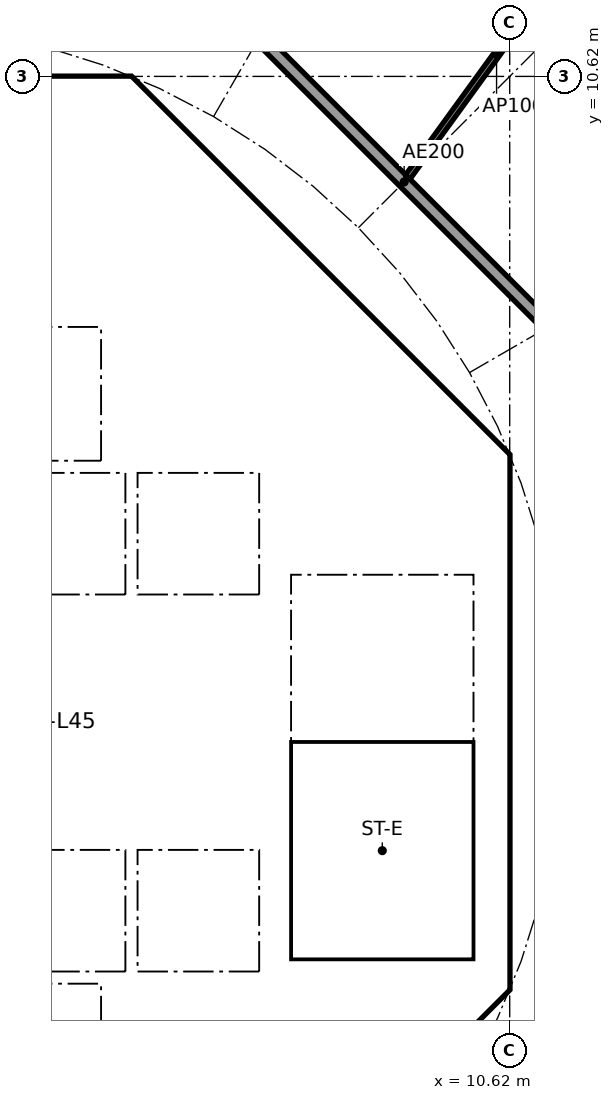
"""IFC4 building model, lengths in metres.
Left out: names, types, materials, properties, quantities, classifications, styles, units other than length and angle.
Written with IfcOpenShell. Run it as: python <this file> out.ifc"""

import sys

from ifc_helpers import new_model, si_unit, direction, frame, frame_2d, origin, place, context, subcontext, project, spatial, polyline, rectangle, outline, extrude, element, fill, save


model = new_model("IFC4")
c1 = context("Model", 3, precision=1e-05, world=origin(), true_north=direction((0.0, 1.0)))
c2 = subcontext(c1, "Body", "Model", "MODEL_VIEW")
j1 = project(units=[si_unit("LENGTHUNIT", "METRE"), si_unit("PLANEANGLEUNIT", "RADIAN")], contexts=[c1])
p1 = place(None, origin())
s1 = spatial("IfcSite", under=j1, at=p1, CompositionType="ELEMENT")
p2 = place(p1, origin())
s2 = spatial("IfcBuilding", under=s1, at=p2, CompositionType="ELEMENT")
p3 = place(p2, frame((0.0, 0.0, 173.3)))
s3 = spatial("IfcBuildingStorey", under=s2, at=p3, CompositionType="ELEMENT", Elevation=173.3)
p4 = place(p3, frame((9.988, 4.613, 0.0), z_axis=(0.0, 0.0, 1.0), x_axis=(-0.707106781187, 0.707106781187, 0.0)))
e1 = element("IfcWall", 1, at=p4, inside=s3, PredefinedType="SHEAR", context=c2, shape_type="SweptSolid", body=[
    extrude(rectangle(XDim=7.602, YDim=0.6, at=frame_2d((3.801, 0.0))), origin(), (0.0, 0.0, 1.0), 3.44),
])
p5 = place(p4, frame((3.201, 0.0, 0.0)))
e2 = element("IfcOpeningElement", 2, at=p5, cuts=e1, PredefinedType="OPENING", context=c2, shape_type="SweptSolid", body=[
    extrude(rectangle(XDim=1.2, YDim=2.1, at=frame_2d((0.6, 1.05))), frame((0.0, 0.31, 0.0), z_axis=(0.0, -1.0, 0.0), x_axis=(1.0, 0.0, 0.0)), (0.0, 0.0, 1.0), 0.62),
])
p6 = place(p3, frame((4.613, -9.988, 0.0), z_axis=(0.0, 0.0, 1.0), x_axis=(0.707106781187, 0.707106781187, 0.0)))
e3 = element("IfcWall", 3, at=p6, inside=s3, PredefinedType="SHEAR", context=c2, shape_type="SweptSolid", body=[
    extrude(rectangle(XDim=7.602, YDim=0.6, at=frame_2d((3.801, 0.0))), origin(), (0.0, 0.0, 1.0), 3.44),
])
p7 = place(p6, frame((3.201, 0.0, 0.0)))
e4 = element("IfcOpeningElement", 4, at=p7, cuts=e3, PredefinedType="OPENING", context=c2, shape_type="SweptSolid", body=[
    extrude(rectangle(XDim=1.2, YDim=2.1, at=frame_2d((0.6, 1.05))), frame((0.0, 0.31, 0.0), z_axis=(0.0, -1.0, 0.0), x_axis=(1.0, 0.0, 0.0)), (0.0, 0.0, 1.0), 0.62),
])
p8 = place(p3, frame((4.0, 4.3, 0.0), z_axis=(0.0, 0.0, 1.0), x_axis=(0.0, 1.0, 0.0)))
e5 = element("IfcWall", 5, at=p8, inside=s3, PredefinedType="SOLIDWALL", context=c2, shape_type="SweptSolid", body=[
    extrude(rectangle(XDim=2.2, YDim=0.2, at=frame_2d((1.1, 0.0))), origin(), (0.0, 0.0, 1.0), 3.44),
])
p9 = place(p8, frame((0.55, 0.0, 0.0)))
e6 = element("IfcOpeningElement", 6, at=p9, cuts=e5, PredefinedType="OPENING", context=c2, shape_type="SweptSolid", body=[
    extrude(rectangle(XDim=1.1, YDim=2.1, at=frame_2d((0.55, 1.05))), frame((0.0, 0.11, 0.0), z_axis=(0.0, -1.0, 0.0), x_axis=(1.0, 0.0, 0.0)), (0.0, 0.0, 1.0), 0.22),
])
p10 = place(p3, frame((-6.7, 2.0, 0.0), z_axis=(0.0, 0.0, 1.0), x_axis=(1.0, 0.0, 0.0)))
e7 = element("IfcWall", 7, at=p10, inside=s3, PredefinedType="SOLIDWALL", context=c2, shape_type="SweptSolid", body=[
    extrude(rectangle(XDim=13.4, YDim=0.2, at=frame_2d((6.7, 0.0))), origin(), (0.0, 0.0, 1.0), 3.44),
])
p11 = place(p10, frame((7.25, 0.0, 0.0)))
e8 = element("IfcOpeningElement", 8, at=p11, cuts=e7, PredefinedType="OPENING", context=c2, shape_type="SweptSolid", body=[
    extrude(rectangle(XDim=1.1, YDim=2.1, at=frame_2d((0.55, 1.05))), frame((0.0, 0.11, 0.0), z_axis=(0.0, -1.0, 0.0), x_axis=(1.0, 0.0, 0.0)), (0.0, 0.0, 1.0), 0.22),
])
p12 = place(p10, frame((9.45, 0.0, 0.0)))
e9 = element("IfcOpeningElement", 9, at=p12, cuts=e7, PredefinedType="OPENING", context=c2, shape_type="SweptSolid", body=[
    extrude(rectangle(XDim=1.1, YDim=2.1, at=frame_2d((0.55, 1.05))), frame((0.0, 0.11, 0.0), z_axis=(0.0, -1.0, 0.0), x_axis=(1.0, 0.0, 0.0)), (0.0, 0.0, 1.0), 0.22),
])
p13 = place(p10, frame((0.75, 0.0, 0.0)))
e10 = element("IfcOpeningElement", 10, at=p13, cuts=e7, PredefinedType="OPENING", context=c2, shape_type="SweptSolid", body=[
    extrude(rectangle(XDim=0.9, YDim=2.1, at=frame_2d((0.45, 1.05))), frame((0.0, 0.11, 0.0), z_axis=(0.0, -1.0, 0.0), x_axis=(1.0, 0.0, 0.0)), (0.0, 0.0, 1.0), 0.22),
])
p14 = place(p10, frame((4.05, 0.0, 0.0)))
e11 = element("IfcOpeningElement", 11, at=p14, cuts=e7, PredefinedType="OPENING", context=c2, shape_type="SweptSolid", body=[
    extrude(rectangle(XDim=0.9, YDim=2.1, at=frame_2d((0.45, 1.05))), frame((0.0, 0.11, 0.0), z_axis=(0.0, -1.0, 0.0), x_axis=(1.0, 0.0, 0.0)), (0.0, 0.0, 1.0), 0.22),
])
p15 = place(p3, frame((6.7, 4.0, 0.0), z_axis=(0.0, 0.0, 1.0), x_axis=(1.0, 0.0, 0.0)))
e12 = element("IfcWall", 12, at=p15, inside=s3, PredefinedType="SOLIDWALL", context=c2, shape_type="SweptSolid", body=[
    extrude(rectangle(XDim=3.325, YDim=0.2, at=frame_2d((1.662, 0.0))), origin(), (0.0, 0.0, 1.0), 3.44),
])
p16 = place(p15, frame((1.25, 0.0, 0.0)))
e13 = element("IfcOpeningElement", 13, at=p16, cuts=e12, PredefinedType="OPENING", context=c2, shape_type="SweptSolid", body=[
    extrude(rectangle(XDim=1.1, YDim=2.1, at=frame_2d((0.55, 1.05))), frame((0.0, 0.11, 0.0), z_axis=(0.0, -1.0, 0.0), x_axis=(1.0, 0.0, 0.0)), (0.0, 0.0, 1.0), 0.22),
])
p17 = place(p3, frame((4.0, 7.025, 0.0), z_axis=(0.0, 0.0, 1.0), x_axis=(0.0, 1.0, 0.0)))
e14 = element("IfcWall", 14, at=p17, inside=s3, PredefinedType="SOLIDWALL", context=c2, shape_type="SweptSolid", body=[
    extrude(rectangle(XDim=3.0, YDim=0.2, at=frame_2d((1.5, 0.0))), origin(), (0.0, 0.0, 1.0), 3.44),
])
p18 = place(p17, frame((0.925, 0.0, 0.0)))
e15 = element("IfcOpeningElement", 15, at=p18, cuts=e14, PredefinedType="OPENING", context=c2, shape_type="SweptSolid", body=[
    extrude(rectangle(XDim=1.1, YDim=2.1, at=frame_2d((0.55, 1.05))), frame((0.0, 0.11, 0.0), z_axis=(0.0, -1.0, 0.0), x_axis=(1.0, 0.0, 0.0)), (0.0, 0.0, 1.0), 0.22),
])
p19 = place(p3, frame((4.0, -6.5, 0.0), z_axis=(0.0, 0.0, 1.0), x_axis=(0.0, 1.0, 0.0)))
e16 = element("IfcWall", 16, at=p19, inside=s3, PredefinedType="SOLIDWALL", context=c2, shape_type="SweptSolid", body=[
    extrude(rectangle(XDim=2.2, YDim=0.2, at=frame_2d((1.1, 0.0))), origin(), (0.0, 0.0, 1.0), 3.44),
])
p20 = place(p19, frame((0.55, 0.0, 0.0)))
e17 = element("IfcOpeningElement", 17, at=p20, cuts=e16, PredefinedType="OPENING", context=c2, shape_type="SweptSolid", body=[
    extrude(rectangle(XDim=1.1, YDim=2.1, at=frame_2d((0.55, 1.05))), frame((0.0, 0.11, 0.0), z_axis=(0.0, -1.0, 0.0), x_axis=(1.0, 0.0, 0.0)), (0.0, 0.0, 1.0), 0.22),
])
p21 = place(p3, frame((-6.7, -2.0, 0.0), z_axis=(0.0, 0.0, 1.0), x_axis=(1.0, 0.0, 0.0)))
e18 = element("IfcWall", 18, at=p21, inside=s3, PredefinedType="SOLIDWALL", context=c2, shape_type="SweptSolid", body=[
    extrude(rectangle(XDim=13.4, YDim=0.2, at=frame_2d((6.7, 0.0))), origin(), (0.0, 0.0, 1.0), 3.44),
])
p22 = place(p21, frame((5.05, 0.0, 0.0)))
e19 = element("IfcOpeningElement", 19, at=p22, cuts=e18, PredefinedType="OPENING", context=c2, shape_type="SweptSolid", body=[
    extrude(rectangle(XDim=1.1, YDim=2.1, at=frame_2d((0.55, 1.05))), frame((0.0, 0.11, 0.0), z_axis=(0.0, -1.0, 0.0), x_axis=(1.0, 0.0, 0.0)), (0.0, 0.0, 1.0), 0.22),
])
p23 = place(p21, frame((7.25, 0.0, 0.0)))
e20 = element("IfcOpeningElement", 20, at=p23, cuts=e18, PredefinedType="OPENING", context=c2, shape_type="SweptSolid", body=[
    extrude(rectangle(XDim=1.1, YDim=2.1, at=frame_2d((0.55, 1.05))), frame((0.0, 0.11, 0.0), z_axis=(0.0, -1.0, 0.0), x_axis=(1.0, 0.0, 0.0)), (0.0, 0.0, 1.0), 0.22),
])
p24 = place(p21, frame((1.85, 0.0, 0.0)))
e21 = element("IfcOpeningElement", 21, at=p24, cuts=e18, PredefinedType="OPENING", context=c2, shape_type="SweptSolid", body=[
    extrude(rectangle(XDim=0.9, YDim=2.1, at=frame_2d((0.45, 1.05))), frame((0.0, 0.11, 0.0), z_axis=(0.0, -1.0, 0.0), x_axis=(1.0, 0.0, 0.0)), (0.0, 0.0, 1.0), 0.22),
])
p25 = place(p3, origin())
e22 = element("IfcWall", 22, at=p25, inside=s3, PredefinedType="SHEAR", context=c2, shape_type="SweptSolid", body=[
    extrude(outline(polyline([(-4.152, 10.025), (-4.401, 9.776), (-4.825, 10.2), (-4.401, 10.625), (4.401, 10.625), (4.825, 10.2), (4.401, 9.776), (4.152, 10.025), (-4.152, 10.025)])), origin(), (0.0, 0.0, 1.0), 3.44),
])
p26 = place(p3, origin())
e23 = element("IfcWall", 23, at=p26, inside=s3, PredefinedType="SHEAR", context=c2, shape_type="SweptSolid", body=[
    extrude(outline(polyline([(9.776, -4.401), (10.025, -4.152), (10.025, -3.801), (10.025, 4.152), (9.776, 4.401), (10.2, 4.825), (10.625, 4.401), (10.625, -4.401), (10.2, -4.825), (9.776, -4.401)])), origin(), (0.0, 0.0, 1.0), 3.44),
])
p27 = place(p3, origin())
e24 = element("IfcWall", 24, at=p27, inside=s3, PredefinedType="SOLIDWALL", context=c2, shape_type="SweptSolid", body=[
    extrude(outline(polyline([(-6.7, 4.3), (6.7, 4.3), (6.7, 2.1), (6.5, 2.1), (6.5, 4.1), (4.5, 4.1), (4.5, 2.1), (4.3, 2.1), (4.3, 4.1), (2.3, 4.1), (2.3, 2.1), (2.1, 2.1), (2.1, 4.1), (0.1, 4.1), (0.1, 2.1), (-0.1, 2.1), (-0.1, 4.1), (-4.3, 4.1), (-4.3, 2.1), (-4.5, 2.1), (-4.5, 4.1), (-6.5, 4.1), (-6.5, 2.1), (-6.7, 2.1), (-6.7, 4.3)])), origin(), (0.0, 0.0, 1.0), 3.44),
])
p28 = place(p3, origin())
e25 = element("IfcWall", 25, at=p28, inside=s3, PredefinedType="SOLIDWALL", context=c2, shape_type="SweptSolid", body=[
    extrude(outline(polyline([(-6.7, -2.1), (-6.5, -2.1), (-6.5, -4.1), (-2.3, -4.1), (-2.3, -2.1), (-2.1, -2.1), (-2.1, -4.1), (-0.1, -4.1), (-0.1, -2.1), (0.1, -2.1), (0.1, -4.1), (2.1, -4.1), (2.1, -2.1), (2.3, -2.1), (2.3, -4.1), (4.3, -4.1), (4.3, -2.1), (4.5, -2.1), (4.5, -4.1), (6.5, -4.1), (6.5, -2.1), (6.7, -2.1), (6.7, -4.3), (-6.7, -4.3), (-6.7, -2.1)])), origin(), (0.0, 0.0, 1.0), 3.44),
])
p29 = place(p3, origin())
e26 = element("IfcWall", 26, at=p29, inside=s3, PredefinedType="SOLIDWALL", context=c2, shape_type="SweptSolid", body=[
    extrude(outline(polyline([(4.1, 6.5), (-4.1, 6.5), (-4.1, 7.025), (4.1, 7.025), (4.1, 6.5)])), origin(), (0.0, 0.0, 1.0), 3.44),
])
p30 = place(p3, origin())
e27 = element("IfcWall", 27, at=p30, inside=s3, PredefinedType="SOLIDWALL", context=c2, shape_type="SweptSolid", body=[
    extrude(outline(polyline([(7.025, -3.9), (6.7, -3.9), (6.7, 3.9), (7.025, 3.9), (7.025, -3.9)])), origin(), (0.0, 0.0, 1.0), 3.44),
])
p31 = place(p3, origin())
e28 = element("IfcWall", 28, at=p31, inside=s3, PredefinedType="SOLIDWALL", context=c2, shape_type="SweptSolid", body=[
    extrude(outline(polyline([(10.025, -4.1), (6.7, -4.1), (6.7, -3.9), (10.025, -3.9), (10.025, -4.1)])), origin(), (0.0, 0.0, 1.0), 3.44),
])
p32 = place(p3, frame((12.635, 5.134, 0.0), z_axis=(0.0, 0.0, 1.0), x_axis=(-0.707106781187, 0.707106781187, 0.0)))
e29 = element("IfcWall", 29, at=p32, inside=s3, PredefinedType="PARTITIONING", context=c2, shape_type="SweptSolid", body=[
    extrude(rectangle(XDim=10.609, YDim=0.2, at=frame_2d((5.305, 0.0))), origin(), (0.0, 0.0, 1.0), 3.44),
])
p33 = place(p3, frame((8.943, 8.966, 0.0), z_axis=(0.0, 0.0, 1.0), x_axis=(0.587187896734, 0.809450661825, 0.0)))
e30 = element("IfcWall", 30, at=p33, inside=s3, PredefinedType="PARTITIONING", context=c2, shape_type="SweptSolid", body=[
    extrude(rectangle(XDim=4.975, YDim=0.1, at=frame_2d((2.487, 0.0))), origin(), (0.0, 0.0, 1.0), 2.756),
])
p34 = place(p12, origin())
e31 = element("IfcDoor", 31, at=p34, inside=s3, OperationType="DOUBLE_DOOR_SLIDING", PredefinedType="DOOR", context=c2, shape_type="SweptSolid", body=[
    extrude(rectangle(XDim=1.1, YDim=2.1, at=frame_2d((0.55, 1.05))), frame((0.0, 0.025, 0.0), z_axis=(0.0, -1.0, 0.0), x_axis=(1.0, 0.0, 0.0)), (0.0, 0.0, 1.0), 0.05),
])
fill(e9, e31)
p35 = place(p9, origin())
e32 = element("IfcDoor", 32, at=p35, inside=s3, OperationType="DOUBLE_DOOR_SLIDING", PredefinedType="DOOR", context=c2, shape_type="SweptSolid", body=[
    extrude(rectangle(XDim=1.1, YDim=2.1, at=frame_2d((0.55, 1.05))), frame((0.0, 0.025, 0.0), z_axis=(0.0, -1.0, 0.0), x_axis=(1.0, 0.0, 0.0)), (0.0, 0.0, 1.0), 0.05),
])
fill(e6, e32)
p36 = place(p20, origin())
e33 = element("IfcDoor", 33, at=p36, inside=s3, OperationType="DOUBLE_DOOR_SLIDING", PredefinedType="DOOR", context=c2, shape_type="SweptSolid", body=[
    extrude(rectangle(XDim=1.1, YDim=2.1, at=frame_2d((0.55, 1.05))), frame((0.0, 0.025, 0.0), z_axis=(0.0, -1.0, 0.0), x_axis=(1.0, 0.0, 0.0)), (0.0, 0.0, 1.0), 0.05),
])
fill(e17, e33)
p37 = place(p16, frame((1.1, 0.0, 0.0), x_axis=(-1.0, 0.0, 0.0)))
e34 = element("IfcDoor", 34, at=p37, inside=s3, OperationType="SINGLE_SWING_LEFT", PredefinedType="DOOR", context=c2, shape_type="SweptSolid", body=[
    extrude(rectangle(XDim=1.1, YDim=2.1, at=frame_2d((0.55, 1.05))), frame((0.0, 0.025, 0.0), z_axis=(0.0, -1.0, 0.0), x_axis=(1.0, 0.0, 0.0)), (0.0, 0.0, 1.0), 0.05),
])
fill(e13, e34)
p38 = place(p18, origin())
e35 = element("IfcDoor", 35, at=p38, inside=s3, OperationType="SINGLE_SWING_RIGHT", PredefinedType="DOOR", context=c2, shape_type="SweptSolid", body=[
    extrude(rectangle(XDim=1.1, YDim=2.1, at=frame_2d((0.55, 1.05))), frame((0.0, 0.025, 0.0), z_axis=(0.0, -1.0, 0.0), x_axis=(1.0, 0.0, 0.0)), (0.0, 0.0, 1.0), 0.05),
])
fill(e15, e35)
p39 = place(p5, origin())
e36 = element("IfcDoor", 36, at=p39, inside=s3, OperationType="SINGLE_SWING_RIGHT", PredefinedType="DOOR", context=c2, shape_type="SweptSolid", body=[
    extrude(rectangle(XDim=1.2, YDim=2.1, at=frame_2d((0.6, 1.05))), frame((0.0, 0.025, 0.0), z_axis=(0.0, -1.0, 0.0), x_axis=(1.0, 0.0, 0.0)), (0.0, 0.0, 1.0), 0.05),
])
fill(e2, e36)
save(model, sys.argv[1])
